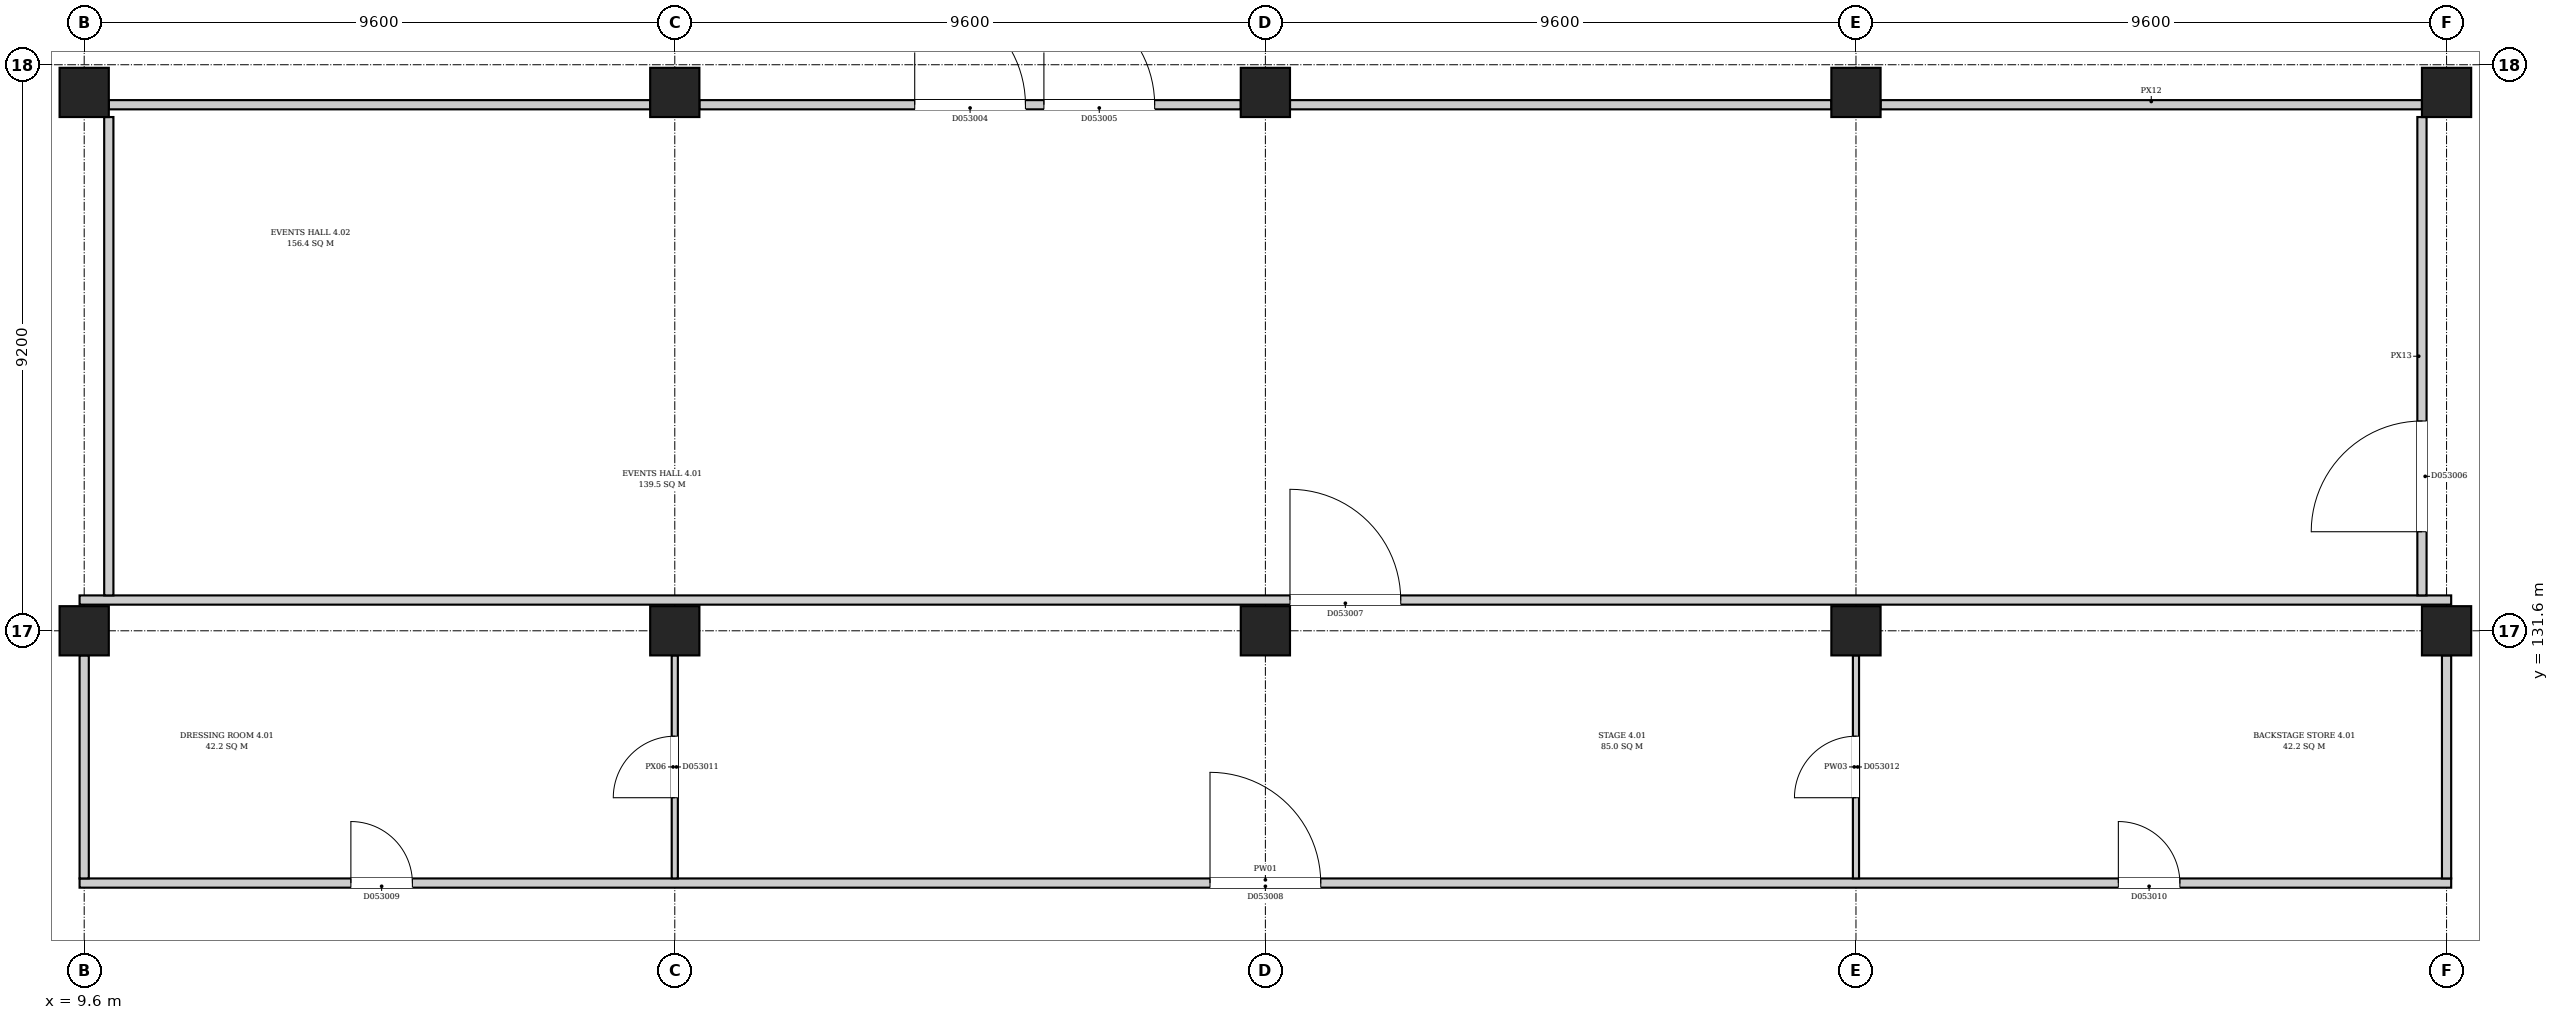
"""IFC4 building model, lengths in metres.
Left out: names, types, materials, properties, quantities, classifications, styles, units other than length and angle.
Written with IfcOpenShell. Run it as: python <this file> out.ifc"""

import sys

from ifc_helpers import new_model, si_unit, direction, frame, frame_2d, origin, origin_2d, place, context, subcontext, project, spatial, rectangle, extrude, element, fill, save


model = new_model("IFC4")
c1 = context("Model", 3, precision=1e-05, world=origin(), true_north=direction((0.0, 1.0)))
c2 = subcontext(c1, "Body", "Model", "MODEL_VIEW")
j1 = project(units=[si_unit("LENGTHUNIT", "METRE"), si_unit("PLANEANGLEUNIT", "RADIAN")], contexts=[c1])
p1 = place(None, origin())
s1 = spatial("IfcSite", under=j1, at=p1, CompositionType="ELEMENT")
p2 = place(p1, origin())
s2 = spatial("IfcBuilding", under=s1, at=p2, CompositionType="ELEMENT")
p3 = place(p2, frame((0.0, 0.0, 26.7)))
s3 = spatial("IfcBuildingStorey", under=s2, at=p3, CompositionType="ELEMENT", Elevation=26.7)
for number, where, z_axis, x_axis in (
    (1, (9.6, 131.6, 0.0), (0.0, 0.0, 1.0), (1.0, 0.0, 0.0)),
    (2, (19.2, 131.6, 0.0), (0.0, 0.0, 1.0), (1.0, 0.0, 0.0)),
    (3, (28.8, 131.6, 0.0), (0.0, 0.0, 1.0), (1.0, 0.0, 0.0)),
    (4, (38.4, 131.6, 0.0), (0.0, 0.0, 1.0), (1.0, 0.0, 0.0)),
    (5, (48.0, 131.6, 0.0), (0.0, 0.0, 1.0), (1.0, 0.0, 0.0)),
    (6, (9.6, 140.35, 0.0), (0.0, 0.0, 1.0), (1.0, 0.0, 0.0)),
    (7, (19.2, 140.35, 0.0), (0.0, 0.0, 1.0), (1.0, 0.0, 0.0)),
    (8, (28.8, 140.35, 0.0), (0.0, 0.0, 1.0), (1.0, 0.0, 0.0)),
    (9, (38.4, 140.35, 0.0), (0.0, 0.0, 1.0), (1.0, 0.0, 0.0)),
    (10, (48.0, 140.35, 0.0), (0.0, 0.0, 1.0), (1.0, 0.0, 0.0)),
):
    element("IfcColumn", number, at=place(p3, frame(where, z_axis=z_axis, x_axis=x_axis)), inside=s3, PredefinedType="COLUMN", context=c2, shape_type="SweptSolid", body=[
        extrude(rectangle(XDim=0.8, YDim=0.8, at=origin_2d()), origin(), (0.0, 0.0, 1.0), 5.2),
    ])
p4 = place(p3, frame((9.525, 127.5, 0.0), z_axis=(0.0, 0.0, 1.0), x_axis=(1.0, 0.0, 0.0)))
e11 = element("IfcWall", 11, at=p4, inside=s3, PredefinedType="PARTITIONING", context=c2, shape_type="SweptSolid", body=[
    extrude(rectangle(XDim=38.55, YDim=0.15, at=frame_2d((19.275, 0.0))), origin(), (0.0, 0.0, 1.0), 4.85),
])
p5 = place(p4, frame((18.375, 0.0, 0.0)))
e12 = element("IfcOpeningElement", 12, at=p5, cuts=e11, PredefinedType="OPENING", context=c2, shape_type="SweptSolid", body=[
    extrude(rectangle(XDim=1.8, YDim=2.1, at=frame_2d((0.9, 1.05))), frame((0.0, 0.085, 0.0), z_axis=(0.0, -1.0, 0.0), x_axis=(1.0, 0.0, 0.0)), (0.0, 0.0, 1.0), 0.17),
])
p6 = place(p4, frame((4.41, 0.0, 0.0)))
e13 = element("IfcOpeningElement", 13, at=p6, cuts=e11, PredefinedType="OPENING", context=c2, shape_type="SweptSolid", body=[
    extrude(rectangle(XDim=1.0, YDim=2.1, at=frame_2d((0.5, 1.05))), frame((0.0, 0.085, 0.0), z_axis=(0.0, -1.0, 0.0), x_axis=(1.0, 0.0, 0.0)), (0.0, 0.0, 1.0), 0.17),
])
p7 = place(p4, frame((33.14, 0.0, 0.0)))
e14 = element("IfcOpeningElement", 14, at=p7, cuts=e11, PredefinedType="OPENING", context=c2, shape_type="SweptSolid", body=[
    extrude(rectangle(XDim=1.0, YDim=2.1, at=frame_2d((0.5, 1.05))), frame((0.0, 0.085, 0.0), z_axis=(0.0, -1.0, 0.0), x_axis=(1.0, 0.0, 0.0)), (0.0, 0.0, 1.0), 0.17),
])
p8 = place(p3, frame((9.6, 127.575, 0.0), z_axis=(0.0, 0.0, 1.0), x_axis=(0.0, 1.0, 0.0)))
e15 = element("IfcWall", 15, at=p8, inside=s3, PredefinedType="PARTITIONING", context=c2, shape_type="SweptSolid", body=[
    extrude(rectangle(XDim=3.625, YDim=0.15, at=frame_2d((1.812, 0.0))), origin(), (0.0, 0.0, 1.0), 4.45),
])
p9 = place(p3, frame((9.525, 132.1, 0.0), z_axis=(0.0, 0.0, 1.0), x_axis=(1.0, 0.0, 0.0)))
e16 = element("IfcWall", 16, at=p9, inside=s3, PredefinedType="PARTITIONING", context=c2, shape_type="SweptSolid", body=[
    extrude(rectangle(XDim=38.55, YDim=0.15, at=frame_2d((19.275, 0.0))), origin(), (0.0, 0.0, 1.0), 4.85),
])
p10 = place(p9, frame((19.675, 0.0, 0.0)))
e17 = element("IfcOpeningElement", 17, at=p10, cuts=e16, PredefinedType="OPENING", context=c2, shape_type="SweptSolid", body=[
    extrude(rectangle(XDim=1.8, YDim=2.1, at=frame_2d((0.9, 1.05))), frame((0.0, 0.085, 0.0), z_axis=(0.0, -1.0, 0.0), x_axis=(1.0, 0.0, 0.0)), (0.0, 0.0, 1.0), 0.17),
])
p11 = place(p3, frame((10.0, 132.175, 0.0), z_axis=(0.0, 0.0, 1.0), x_axis=(0.0, 1.0, 0.0)))
e18 = element("IfcWall", 18, at=p11, inside=s3, PredefinedType="PARTITIONING", context=c2, shape_type="SweptSolid", body=[
    extrude(rectangle(XDim=7.775, YDim=0.15, at=frame_2d((3.887, 0.0))), origin(), (0.0, 0.0, 1.0), 4.45),
])
p12 = place(p3, frame((10.0, 140.15, 0.0), z_axis=(0.0, 0.0, 1.0), x_axis=(1.0, 0.0, 0.0)))
e19 = element("IfcWall", 19, at=p12, inside=s3, PredefinedType="PARTITIONING", context=c2, shape_type="SweptSolid", body=[
    extrude(rectangle(XDim=8.8, YDim=0.15, at=frame_2d((4.4, 0.0))), origin(), (0.0, 0.0, 1.0), 4.25),
])
p13 = place(p3, frame((19.2, 127.575, 0.0), z_axis=(0.0, 0.0, 1.0), x_axis=(0.0, 1.0, 0.0)))
e20 = element("IfcWall", 20, at=p13, inside=s3, PredefinedType="PARTITIONING", context=c2, shape_type="SweptSolid", body=[
    extrude(rectangle(XDim=3.625, YDim=0.1, at=frame_2d((1.812, 0.0))), origin(), (0.0, 0.0, 1.0), 4.45),
])
p14 = place(p13, frame((1.312, 0.0, 0.0)))
e21 = element("IfcOpeningElement", 21, at=p14, cuts=e20, PredefinedType="OPENING", context=c2, shape_type="SweptSolid", body=[
    extrude(rectangle(XDim=1.0, YDim=2.1, at=frame_2d((0.5, 1.05))), frame((0.0, 0.06, 0.0), z_axis=(0.0, -1.0, 0.0), x_axis=(1.0, 0.0, 0.0)), (0.0, 0.0, 1.0), 0.12),
])
p15 = place(p3, frame((19.6, 140.15, 0.0), z_axis=(0.0, 0.0, 1.0), x_axis=(1.0, 0.0, 0.0)))
e22 = element("IfcWall", 22, at=p15, inside=s3, PredefinedType="PARTITIONING", context=c2, shape_type="SweptSolid", body=[
    extrude(rectangle(XDim=8.8, YDim=0.15, at=frame_2d((4.4, 0.0))), origin(), (0.0, 0.0, 1.0), 4.25),
])
p16 = place(p15, frame((3.5, 0.0, 0.0)))
e23 = element("IfcOpeningElement", 23, at=p16, cuts=e22, PredefinedType="OPENING", context=c2, shape_type="SweptSolid", body=[
    extrude(rectangle(XDim=1.8, YDim=2.1, at=frame_2d((0.9, 1.05))), frame((0.0, 0.085, 0.0), z_axis=(0.0, -1.0, 0.0), x_axis=(1.0, 0.0, 0.0)), (0.0, 0.0, 1.0), 0.17),
])
p17 = place(p15, frame((5.6, 0.0, 0.0)))
e24 = element("IfcOpeningElement", 24, at=p17, cuts=e22, PredefinedType="OPENING", context=c2, shape_type="SweptSolid", body=[
    extrude(rectangle(XDim=1.8, YDim=2.1, at=frame_2d((0.9, 1.05))), frame((0.0, 0.085, 0.0), z_axis=(0.0, -1.0, 0.0), x_axis=(1.0, 0.0, 0.0)), (0.0, 0.0, 1.0), 0.17),
])
p18 = place(p3, frame((29.2, 140.15, 0.0), z_axis=(0.0, 0.0, 1.0), x_axis=(1.0, 0.0, 0.0)))
e25 = element("IfcWall", 25, at=p18, inside=s3, PredefinedType="PARTITIONING", context=c2, shape_type="SweptSolid", body=[
    extrude(rectangle(XDim=8.8, YDim=0.15, at=frame_2d((4.4, 0.0))), origin(), (0.0, 0.0, 1.0), 4.25),
])
p19 = place(p3, frame((38.4, 127.575, 0.0), z_axis=(0.0, 0.0, 1.0), x_axis=(0.0, 1.0, 0.0)))
e26 = element("IfcWall", 26, at=p19, inside=s3, PredefinedType="PARTITIONING", context=c2, shape_type="SweptSolid", body=[
    extrude(rectangle(XDim=3.625, YDim=0.1, at=frame_2d((1.812, 0.0))), origin(), (0.0, 0.0, 1.0), 4.85),
])
p20 = place(p19, frame((1.312, 0.0, 0.0)))
e27 = element("IfcOpeningElement", 27, at=p20, cuts=e26, PredefinedType="OPENING", context=c2, shape_type="SweptSolid", body=[
    extrude(rectangle(XDim=1.0, YDim=2.1, at=frame_2d((0.5, 1.05))), frame((0.0, 0.06, 0.0), z_axis=(0.0, -1.0, 0.0), x_axis=(1.0, 0.0, 0.0)), (0.0, 0.0, 1.0), 0.12),
])
p21 = place(p3, frame((38.8, 140.15, 0.0), z_axis=(0.0, 0.0, 1.0), x_axis=(1.0, 0.0, 0.0)))
e28 = element("IfcWall", 28, at=p21, inside=s3, PredefinedType="PARTITIONING", context=c2, shape_type="SweptSolid", body=[
    extrude(rectangle(XDim=8.8, YDim=0.15, at=frame_2d((4.4, 0.0))), origin(), (0.0, 0.0, 1.0), 4.25),
])
p22 = place(p3, frame((47.6, 132.175, 0.0), z_axis=(0.0, 0.0, 1.0), x_axis=(0.0, 1.0, 0.0)))
e29 = element("IfcWall", 29, at=p22, inside=s3, PredefinedType="PARTITIONING", context=c2, shape_type="SweptSolid", body=[
    extrude(rectangle(XDim=7.775, YDim=0.15, at=frame_2d((3.887, 0.0))), origin(), (0.0, 0.0, 1.0), 4.45),
])
p23 = place(p22, frame((1.035, 0.0, 0.0)))
e30 = element("IfcOpeningElement", 30, at=p23, cuts=e29, PredefinedType="OPENING", context=c2, shape_type="SweptSolid", body=[
    extrude(rectangle(XDim=1.8, YDim=2.1, at=frame_2d((0.9, 1.05))), frame((0.0, 0.085, 0.0), z_axis=(0.0, -1.0, 0.0), x_axis=(1.0, 0.0, 0.0)), (0.0, 0.0, 1.0), 0.17),
])
p24 = place(p3, frame((48.0, 127.575, 0.0), z_axis=(0.0, 0.0, 1.0), x_axis=(0.0, 1.0, 0.0)))
e31 = element("IfcWall", 31, at=p24, inside=s3, PredefinedType="PARTITIONING", context=c2, shape_type="SweptSolid", body=[
    extrude(rectangle(XDim=3.625, YDim=0.15, at=frame_2d((1.812, 0.0))), origin(), (0.0, 0.0, 1.0), 4.45),
])
p25 = place(p16, origin())
e32 = element("IfcDoor", 32, at=p25, inside=s3, OperationType="DOUBLE_DOOR_SINGLE_SWING", PredefinedType="DOOR", context=c2, shape_type="SweptSolid", body=[
    extrude(rectangle(XDim=1.8, YDim=2.1, at=frame_2d((0.9, 1.05))), frame((0.0, 0.025, 0.0), z_axis=(0.0, -1.0, 0.0), x_axis=(1.0, 0.0, 0.0)), (0.0, 0.0, 1.0), 0.05),
])
fill(e23, e32)
p26 = place(p17, origin())
e33 = element("IfcDoor", 33, at=p26, inside=s3, OperationType="DOUBLE_DOOR_SINGLE_SWING", PredefinedType="DOOR", context=c2, shape_type="SweptSolid", body=[
    extrude(rectangle(XDim=1.8, YDim=2.1, at=frame_2d((0.9, 1.05))), frame((0.0, 0.025, 0.0), z_axis=(0.0, -1.0, 0.0), x_axis=(1.0, 0.0, 0.0)), (0.0, 0.0, 1.0), 0.05),
])
fill(e24, e33)
p27 = place(p23, origin())
e34 = element("IfcDoor", 34, at=p27, inside=s3, OperationType="DOUBLE_DOOR_SINGLE_SWING", PredefinedType="DOOR", context=c2, shape_type="SweptSolid", body=[
    extrude(rectangle(XDim=1.8, YDim=2.1, at=frame_2d((0.9, 1.05))), frame((0.0, 0.025, 0.0), z_axis=(0.0, -1.0, 0.0), x_axis=(1.0, 0.0, 0.0)), (0.0, 0.0, 1.0), 0.05),
])
fill(e30, e34)
p28 = place(p10, origin())
e35 = element("IfcDoor", 35, at=p28, inside=s3, OperationType="DOUBLE_DOOR_SINGLE_SWING", PredefinedType="DOOR", context=c2, shape_type="SweptSolid", body=[
    extrude(rectangle(XDim=1.8, YDim=2.1, at=frame_2d((0.9, 1.05))), frame((0.0, 0.025, 0.0), z_axis=(0.0, -1.0, 0.0), x_axis=(1.0, 0.0, 0.0)), (0.0, 0.0, 1.0), 0.05),
])
fill(e17, e35)
p29 = place(p5, origin())
e36 = element("IfcDoor", 36, at=p29, inside=s3, OperationType="DOUBLE_DOOR_SINGLE_SWING", PredefinedType="DOOR", context=c2, shape_type="SweptSolid", body=[
    extrude(rectangle(XDim=1.8, YDim=2.1, at=frame_2d((0.9, 1.05))), frame((0.0, 0.025, 0.0), z_axis=(0.0, -1.0, 0.0), x_axis=(1.0, 0.0, 0.0)), (0.0, 0.0, 1.0), 0.05),
])
fill(e12, e36)
p30 = place(p6, origin())
e37 = element("IfcDoor", 37, at=p30, inside=s3, OperationType="SINGLE_SWING_LEFT", PredefinedType="DOOR", context=c2, shape_type="SweptSolid", body=[
    extrude(rectangle(XDim=1.0, YDim=2.1, at=frame_2d((0.5, 1.05))), frame((0.0, 0.025, 0.0), z_axis=(0.0, -1.0, 0.0), x_axis=(1.0, 0.0, 0.0)), (0.0, 0.0, 1.0), 0.05),
])
fill(e13, e37)
p31 = place(p7, origin())
e38 = element("IfcDoor", 38, at=p31, inside=s3, OperationType="SINGLE_SWING_RIGHT", PredefinedType="DOOR", context=c2, shape_type="SweptSolid", body=[
    extrude(rectangle(XDim=1.0, YDim=2.1, at=frame_2d((0.5, 1.05))), frame((0.0, 0.025, 0.0), z_axis=(0.0, -1.0, 0.0), x_axis=(1.0, 0.0, 0.0)), (0.0, 0.0, 1.0), 0.05),
])
fill(e14, e38)
p32 = place(p14, origin())
e39 = element("IfcDoor", 39, at=p32, inside=s3, OperationType="SINGLE_SWING_LEFT", PredefinedType="DOOR", context=c2, shape_type="SweptSolid", body=[
    extrude(rectangle(XDim=1.0, YDim=2.1, at=frame_2d((0.5, 1.05))), frame((0.0, 0.025, 0.0), z_axis=(0.0, -1.0, 0.0), x_axis=(1.0, 0.0, 0.0)), (0.0, 0.0, 1.0), 0.05),
])
fill(e21, e39)
p33 = place(p20, origin())
e40 = element("IfcDoor", 40, at=p33, inside=s3, OperationType="SINGLE_SWING_RIGHT", PredefinedType="DOOR", context=c2, shape_type="SweptSolid", body=[
    extrude(rectangle(XDim=1.0, YDim=2.1, at=frame_2d((0.5, 1.05))), frame((0.0, 0.025, 0.0), z_axis=(0.0, -1.0, 0.0), x_axis=(1.0, 0.0, 0.0)), (0.0, 0.0, 1.0), 0.05),
])
fill(e27, e40)
save(model, sys.argv[1])
